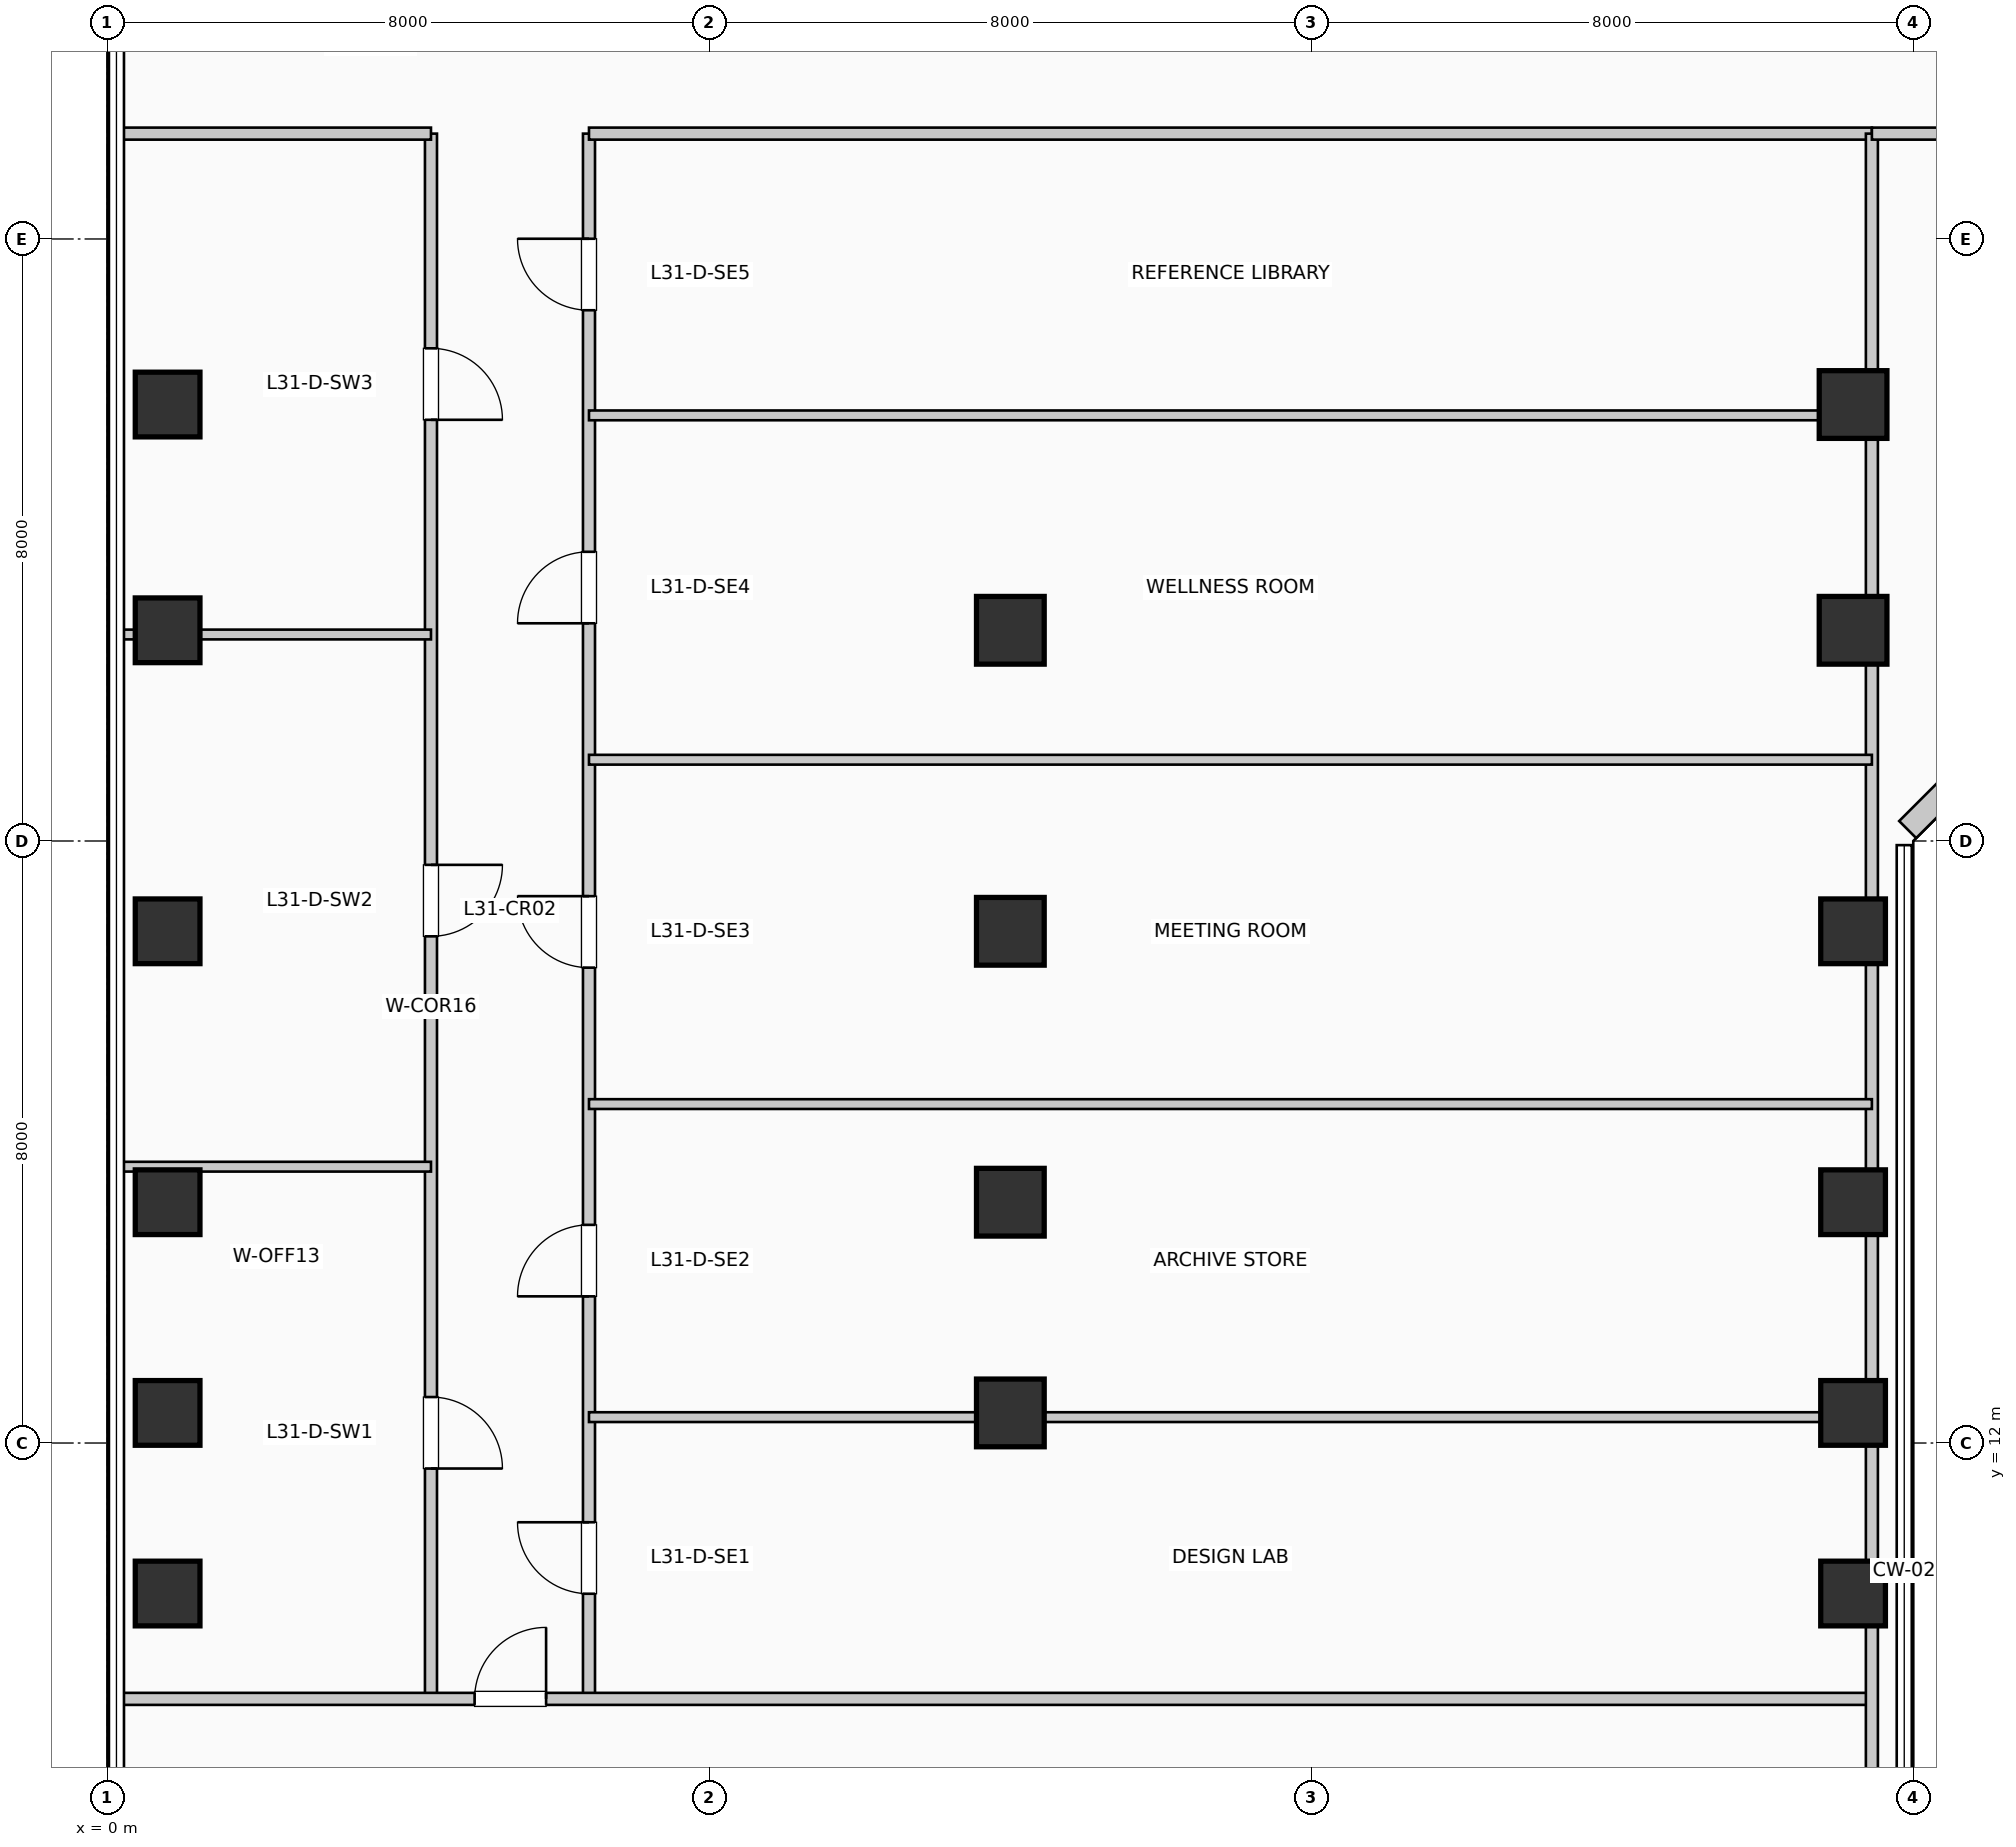
"""IFC4 building model, lengths in metres.
Left out: names, types, materials, properties, quantities, classifications, styles, units other than length and angle.
Written with IfcOpenShell. Run it as: python <this file> out.ifc"""

import sys

from ifc_helpers import new_model, si_unit, direction, frame, frame_2d, origin, origin_2d, place, context, subcontext, project, spatial, rectangle, extrude, element, fill, save


model = new_model("IFC4")
c1 = context("Model", 3, precision=1e-05, world=origin(), true_north=direction((0.0, 1.0)))
c2 = subcontext(c1, "Body", "Model", "MODEL_VIEW")
j1 = project(units=[si_unit("LENGTHUNIT", "METRE"), si_unit("PLANEANGLEUNIT", "RADIAN")], contexts=[c1])
p1 = place(None, origin())
s1 = spatial("IfcSite", under=j1, at=p1, CompositionType="ELEMENT")
p2 = place(p1, origin())
s2 = spatial("IfcBuilding", under=s1, at=p2, CompositionType="ELEMENT")
p3 = place(p2, frame((0.0, 0.0, 130.35)))
s3 = spatial("IfcBuildingStorey", under=s2, at=p3, CompositionType="ELEMENT", Elevation=130.35)
for number, where, z_axis, x_axis in (
    (1, (0.8, 10.0, 0.0), (0.0, 0.0, 1.0), (1.0, 0.0, 0.0)),
    (2, (0.8, 12.4, 0.0), (0.0, 0.0, 1.0), (1.0, 0.0, 0.0)),
    (3, (0.8, 15.2, 0.0), (0.0, 0.0, 1.0), (1.0, 0.0, 0.0)),
    (4, (0.8, 18.8, 0.0), (0.0, 0.0, 1.0), (1.0, 0.0, 0.0)),
    (5, (0.8, 22.8, 0.0), (0.0, 0.0, 1.0), (1.0, 0.0, 0.0)),
    (6, (0.8, 25.8, 0.0), (0.0, 0.0, 1.0), (1.0, 0.0, 0.0)),
):
    element("IfcColumn", number, at=place(p3, frame(where, z_axis=z_axis, x_axis=x_axis)), inside=s3, PredefinedType="COLUMN", context=c2, shape_type="SweptSolid", body=[
        extrude(rectangle(XDim=0.86, YDim=0.86, at=origin_2d()), origin(), (0.0, 0.0, 1.0), 4.62),
    ])
for number, where, z_axis, x_axis in (
    (7, (12.0, 12.4, 0.0), (0.0, 0.0, 1.0), (1.0, 0.0, 0.0)),
    (8, (12.0, 15.2, 0.0), (0.0, 0.0, 1.0), (1.0, 0.0, 0.0)),
    (9, (12.0, 18.8, 0.0), (0.0, 0.0, 1.0), (1.0, 0.0, 0.0)),
    (10, (12.0, 22.8, 0.0), (0.0, 0.0, 1.0), (1.0, 0.0, 0.0)),
):
    element("IfcColumn", number, at=place(p3, frame(where, z_axis=z_axis, x_axis=x_axis)), inside=s3, PredefinedType="COLUMN", context=c2, shape_type="SweptSolid", body=[
        extrude(rectangle(XDim=0.9, YDim=0.9, at=origin_2d()), origin(), (0.0, 0.0, 1.0), 4.62),
    ])
for number, where, z_axis, x_axis in (
    (11, (23.2, 10.0, 0.0), (0.0, 0.0, 1.0), (1.0, 0.0, 0.0)),
    (12, (23.2, 12.4, 0.0), (0.0, 0.0, 1.0), (1.0, 0.0, 0.0)),
    (13, (23.2, 15.2, 0.0), (0.0, 0.0, 1.0), (1.0, 0.0, 0.0)),
    (14, (23.2, 18.8, 0.0), (0.0, 0.0, 1.0), (1.0, 0.0, 0.0)),
):
    element("IfcColumn", number, at=place(p3, frame(where, z_axis=z_axis, x_axis=x_axis)), inside=s3, PredefinedType="COLUMN", context=c2, shape_type="SweptSolid", body=[
        extrude(rectangle(XDim=0.86, YDim=0.86, at=origin_2d()), origin(), (0.0, 0.0, 1.0), 4.62),
    ])
for number, where, z_axis, x_axis in (
    (15, (23.2, 22.8, 0.0), (0.0, 0.0, 1.0), (1.0, 0.0, 0.0)),
    (16, (23.2, 25.8, 0.0), (0.0, 0.0, 1.0), (1.0, 0.0, 0.0)),
):
    element("IfcColumn", number, at=place(p3, frame(where, z_axis=z_axis, x_axis=x_axis)), inside=s3, PredefinedType="COLUMN", context=c2, shape_type="SweptSolid", body=[
        extrude(rectangle(XDim=0.9, YDim=0.9, at=origin_2d()), origin(), (0.0, 0.0, 1.0), 4.62),
    ])
p4 = place(p3, frame((23.926, 20.152, 0.0), z_axis=(0.0, 0.0, 1.0), x_axis=(0.707106781187, 0.707106781187, 0.0)))
e17 = element("IfcWall", 17, at=p4, inside=s3, PredefinedType="SOLIDWALL", context=c2, shape_type="SweptSolid", body=[
    extrude(rectangle(XDim=2.718, YDim=0.32, at=frame_2d((1.359, 0.0))), origin(), (0.0, 0.0, 1.0), 4.37),
])
p5 = place(p3, frame((4.3, 8.6, 0.0), z_axis=(0.0, 0.0, 1.0), x_axis=(0.0, 1.0, 0.0)))
e18 = element("IfcWall", 18, at=p5, inside=s3, PredefinedType="PARTITIONING", context=c2, shape_type="SweptSolid", body=[
    extrude(rectangle(XDim=20.8, YDim=0.16, at=frame_2d((10.4, 0.0))), origin(), (0.0, 0.0, 1.0), 4.37),
])
p6 = place(p5, frame((4.011, 0.0, 0.0), z_axis=(0.0, 0.0, 1.0), x_axis=(-1.0, 0.0, 0.0)))
e19 = element("IfcOpeningElement", 19, at=p6, cuts=e18, PredefinedType="OPENING", context=c2, shape_type="SweptSolid", body=[
    extrude(rectangle(XDim=0.95, YDim=2.15, at=frame_2d((0.475, 1.075))), frame((0.0, 0.09, 0.0), z_axis=(0.0, -1.0, 0.0), x_axis=(1.0, 0.0, 0.0)), (0.0, 0.0, 1.0), 0.18),
])
p7 = place(p5, frame((11.083, 0.0, 0.0), z_axis=(0.0, 0.0, 1.0), x_axis=(-1.0, 0.0, 0.0)))
e20 = element("IfcOpeningElement", 20, at=p7, cuts=e18, PredefinedType="OPENING", context=c2, shape_type="SweptSolid", body=[
    extrude(rectangle(XDim=0.95, YDim=2.15, at=frame_2d((0.475, 1.075))), frame((0.0, 0.09, 0.0), z_axis=(0.0, -1.0, 0.0), x_axis=(1.0, 0.0, 0.0)), (0.0, 0.0, 1.0), 0.18),
])
p8 = place(p5, frame((17.947, 0.0, 0.0), z_axis=(0.0, 0.0, 1.0), x_axis=(-1.0, 0.0, 0.0)))
e21 = element("IfcOpeningElement", 21, at=p8, cuts=e18, PredefinedType="OPENING", context=c2, shape_type="SweptSolid", body=[
    extrude(rectangle(XDim=0.95, YDim=2.15, at=frame_2d((0.475, 1.075))), frame((0.0, 0.09, 0.0), z_axis=(0.0, -1.0, 0.0), x_axis=(1.0, 0.0, 0.0)), (0.0, 0.0, 1.0), 0.18),
])
p9 = place(p3, frame((6.4, 8.6, 0.0), z_axis=(0.0, 0.0, 1.0), x_axis=(0.0, 1.0, 0.0)))
e22 = element("IfcWall", 22, at=p9, inside=s3, PredefinedType="PARTITIONING", context=c2, shape_type="SweptSolid", body=[
    extrude(rectangle(XDim=20.8, YDim=0.16, at=frame_2d((10.4, 0.0))), origin(), (0.0, 0.0, 1.0), 4.37),
])
p10 = place(p9, frame((1.397, 0.0, 0.0)))
e23 = element("IfcOpeningElement", 23, at=p10, cuts=e22, PredefinedType="OPENING", context=c2, shape_type="SweptSolid", body=[
    extrude(rectangle(XDim=0.95, YDim=2.15, at=frame_2d((0.475, 1.075))), frame((0.0, 0.09, 0.0), z_axis=(0.0, -1.0, 0.0), x_axis=(1.0, 0.0, 0.0)), (0.0, 0.0, 1.0), 0.18),
])
p11 = place(p9, frame((5.349, 0.0, 0.0)))
e24 = element("IfcOpeningElement", 24, at=p11, cuts=e22, PredefinedType="OPENING", context=c2, shape_type="SweptSolid", body=[
    extrude(rectangle(XDim=0.95, YDim=2.15, at=frame_2d((0.475, 1.075))), frame((0.0, 0.09, 0.0), z_axis=(0.0, -1.0, 0.0), x_axis=(1.0, 0.0, 0.0)), (0.0, 0.0, 1.0), 0.18),
])
p12 = place(p9, frame((9.717, 0.0, 0.0)))
e25 = element("IfcOpeningElement", 25, at=p12, cuts=e22, PredefinedType="OPENING", context=c2, shape_type="SweptSolid", body=[
    extrude(rectangle(XDim=0.95, YDim=2.15, at=frame_2d((0.475, 1.075))), frame((0.0, 0.09, 0.0), z_axis=(0.0, -1.0, 0.0), x_axis=(1.0, 0.0, 0.0)), (0.0, 0.0, 1.0), 0.18),
])
p13 = place(p9, frame((14.293, 0.0, 0.0)))
e26 = element("IfcOpeningElement", 26, at=p13, cuts=e22, PredefinedType="OPENING", context=c2, shape_type="SweptSolid", body=[
    extrude(rectangle(XDim=0.95, YDim=2.15, at=frame_2d((0.475, 1.075))), frame((0.0, 0.09, 0.0), z_axis=(0.0, -1.0, 0.0), x_axis=(1.0, 0.0, 0.0)), (0.0, 0.0, 1.0), 0.18),
])
p14 = place(p9, frame((18.453, 0.0, 0.0)))
e27 = element("IfcOpeningElement", 27, at=p14, cuts=e22, PredefinedType="OPENING", context=c2, shape_type="SweptSolid", body=[
    extrude(rectangle(XDim=0.95, YDim=2.15, at=frame_2d((0.475, 1.075))), frame((0.0, 0.09, 0.0), z_axis=(0.0, -1.0, 0.0), x_axis=(1.0, 0.0, 0.0)), (0.0, 0.0, 1.0), 0.18),
])
p15 = place(p3, frame((0.19, 8.6, 0.0), z_axis=(0.0, 0.0, 1.0), x_axis=(1.0, 0.0, 0.0)))
e28 = element("IfcWall", 28, at=p15, inside=s3, PredefinedType="PARTITIONING", context=c2, shape_type="SweptSolid", body=[
    extrude(rectangle(XDim=23.26, YDim=0.16, at=frame_2d((11.63, 0.0))), origin(), (0.0, 0.0, 1.0), 4.37),
])
p16 = place(p15, frame((4.69, 0.0, 0.0)))
e29 = element("IfcOpeningElement", 29, at=p16, cuts=e28, PredefinedType="OPENING", context=c2, shape_type="SweptSolid", body=[
    extrude(rectangle(XDim=0.95, YDim=2.15, at=frame_2d((0.475, 1.075))), frame((0.0, 0.09, 0.0), z_axis=(0.0, -1.0, 0.0), x_axis=(1.0, 0.0, 0.0)), (0.0, 0.0, 1.0), 0.18),
])
p17 = place(p3, frame((0.19, 29.4, 0.0), z_axis=(0.0, 0.0, 1.0), x_axis=(1.0, 0.0, 0.0)))
e30 = element("IfcWall", 30, at=p17, inside=s3, PredefinedType="PARTITIONING", context=c2, shape_type="SweptSolid", body=[
    extrude(rectangle(XDim=4.11, YDim=0.16, at=frame_2d((2.055, 0.0))), origin(), (0.0, 0.0, 1.0), 4.025),
])
p18 = place(p3, frame((6.4, 29.4, 0.0), z_axis=(0.0, 0.0, 1.0), x_axis=(1.0, 0.0, 0.0)))
e31 = element("IfcWall", 31, at=p18, inside=s3, PredefinedType="PARTITIONING", context=c2, shape_type="SweptSolid", body=[
    extrude(rectangle(XDim=17.05, YDim=0.16, at=frame_2d((8.525, 0.0))), origin(), (0.0, 0.0, 1.0), 4.025),
])
p19 = place(p3, frame((23.45, 1.04, 0.0), z_axis=(0.0, 0.0, 1.0), x_axis=(0.0, 1.0, 0.0)))
e32 = element("IfcWall", 32, at=p19, inside=s3, PredefinedType="PARTITIONING", context=c2, shape_type="SweptSolid", body=[
    extrude(rectangle(XDim=28.36, YDim=0.16, at=frame_2d((14.18, 0.0))), origin(), (0.0, 0.0, 1.0), 3.705),
])
for number, where, z_axis, x_axis in (
    (33, (0.19, 15.672, 0.0), (0.0, 0.0, 1.0), (1.0, 0.0, 0.0)),
    (34, (0.19, 22.744, 0.0), (0.0, 0.0, 1.0), (1.0, 0.0, 0.0)),
):
    element("IfcWall", number, at=place(p3, frame(where, z_axis=z_axis, x_axis=x_axis)), inside=s3, PredefinedType="PARTITIONING", context=c2, shape_type="SweptSolid", body=[
        extrude(rectangle(XDim=4.11, YDim=0.13, at=frame_2d((2.055, 0.0))), origin(), (0.0, 0.0, 1.0), 3.705),
    ])
p20 = place(p3, frame((6.4, 12.344, 0.0), z_axis=(0.0, 0.0, 1.0), x_axis=(1.0, 0.0, 0.0)))
e35 = element("IfcWall", 35, at=p20, inside=s3, PredefinedType="PARTITIONING", context=c2, shape_type="SweptSolid", body=[
    extrude(rectangle(XDim=17.05, YDim=0.13, at=frame_2d((8.525, 0.0))), origin(), (0.0, 0.0, 1.0), 3.705),
])
for number, where, z_axis, x_axis in (
    (36, (6.4, 16.504, 0.0), (0.0, 0.0, 1.0), (1.0, 0.0, 0.0)),
    (37, (6.4, 21.08, 0.0), (0.0, 0.0, 1.0), (1.0, 0.0, 0.0)),
):
    element("IfcWall", number, at=place(p3, frame(where, z_axis=z_axis, x_axis=x_axis)), inside=s3, PredefinedType="PARTITIONING", context=c2, shape_type="SweptSolid", body=[
        extrude(rectangle(XDim=17.05, YDim=0.13, at=frame_2d((8.525, 0.0))), origin(), (0.0, 0.0, 1.0), 4.37),
    ])
p21 = place(p3, frame((6.4, 25.656, 0.0), z_axis=(0.0, 0.0, 1.0), x_axis=(1.0, 0.0, 0.0)))
e38 = element("IfcWall", 38, at=p21, inside=s3, PredefinedType="PARTITIONING", context=c2, shape_type="SweptSolid", body=[
    extrude(rectangle(XDim=17.05, YDim=0.13, at=frame_2d((8.525, 0.0))), origin(), (0.0, 0.0, 1.0), 3.705),
])
p22 = place(p3, frame((23.45, 29.4, 0.0), z_axis=(0.0, 0.0, 1.0), x_axis=(1.0, 0.0, 0.0)))
e39 = element("IfcWall", 39, at=p22, inside=s3, PredefinedType="PARTITIONING", context=c2, shape_type="SweptSolid", body=[
    extrude(rectangle(XDim=26.56, YDim=0.16, at=frame_2d((13.28, 0.0))), origin(), (0.0, 0.0, 1.0), 4.025),
])
p23 = place(p22, frame((6.052, 0.0, 0.0), z_axis=(0.0, 0.0, 1.0), x_axis=(-1.0, 0.0, 0.0)))
e40 = element("IfcOpeningElement", 40, at=p23, cuts=e39, PredefinedType="OPENING", context=c2, shape_type="SweptSolid", body=[
    extrude(rectangle(XDim=0.95, YDim=2.15, at=frame_2d((0.475, 1.075))), frame((0.0, 0.09, 0.0), z_axis=(0.0, -1.0, 0.0), x_axis=(1.0, 0.0, 0.0)), (0.0, 0.0, 1.0), 0.18),
])
p24 = place(p22, frame((19.333, 0.0, 0.0), z_axis=(0.0, 0.0, 1.0), x_axis=(-1.0, 0.0, 0.0)))
e41 = element("IfcOpeningElement", 41, at=p24, cuts=e39, PredefinedType="OPENING", context=c2, shape_type="SweptSolid", body=[
    extrude(rectangle(XDim=0.95, YDim=2.15, at=frame_2d((0.475, 1.075))), frame((0.0, 0.09, 0.0), z_axis=(0.0, -1.0, 0.0), x_axis=(1.0, 0.0, 0.0)), (0.0, 0.0, 1.0), 0.18),
])
p25 = place(p16, origin())
e42 = element("IfcDoor", 42, at=p25, inside=s3, OperationType="SINGLE_SWING_RIGHT", PredefinedType="DOOR", context=c2, shape_type="SweptSolid", body=[
    extrude(rectangle(XDim=0.95, YDim=2.15, at=frame_2d((0.475, 1.075))), frame((0.0, 0.025, 0.0), z_axis=(0.0, -1.0, 0.0), x_axis=(1.0, 0.0, 0.0)), (0.0, 0.0, 1.0), 0.05),
])
fill(e29, e42)
p26 = place(p6, origin())
e43 = element("IfcDoor", 43, at=p26, inside=s3, OperationType="SINGLE_SWING_LEFT", PredefinedType="DOOR", context=c2, shape_type="SweptSolid", body=[
    extrude(rectangle(XDim=0.95, YDim=2.15, at=frame_2d((0.475, 1.075))), frame((0.0, 0.025, 0.0), z_axis=(0.0, -1.0, 0.0), x_axis=(1.0, 0.0, 0.0)), (0.0, 0.0, 1.0), 0.05),
])
fill(e19, e43)
p27 = place(p7, origin())
e44 = element("IfcDoor", 44, at=p27, inside=s3, OperationType="SINGLE_SWING_RIGHT", PredefinedType="DOOR", context=c2, shape_type="SweptSolid", body=[
    extrude(rectangle(XDim=0.95, YDim=2.15, at=frame_2d((0.475, 1.075))), frame((0.0, 0.025, 0.0), z_axis=(0.0, -1.0, 0.0), x_axis=(1.0, 0.0, 0.0)), (0.0, 0.0, 1.0), 0.05),
])
fill(e20, e44)
p28 = place(p8, origin())
e45 = element("IfcDoor", 45, at=p28, inside=s3, OperationType="SINGLE_SWING_LEFT", PredefinedType="DOOR", context=c2, shape_type="SweptSolid", body=[
    extrude(rectangle(XDim=0.95, YDim=2.15, at=frame_2d((0.475, 1.075))), frame((0.0, 0.025, 0.0), z_axis=(0.0, -1.0, 0.0), x_axis=(1.0, 0.0, 0.0)), (0.0, 0.0, 1.0), 0.05),
])
fill(e21, e45)
p29 = place(p10, origin())
e46 = element("IfcDoor", 46, at=p29, inside=s3, OperationType="SINGLE_SWING_RIGHT", PredefinedType="DOOR", context=c2, shape_type="SweptSolid", body=[
    extrude(rectangle(XDim=0.95, YDim=2.15, at=frame_2d((0.475, 1.075))), frame((0.0, 0.025, 0.0), z_axis=(0.0, -1.0, 0.0), x_axis=(1.0, 0.0, 0.0)), (0.0, 0.0, 1.0), 0.05),
])
fill(e23, e46)
p30 = place(p11, origin())
e47 = element("IfcDoor", 47, at=p30, inside=s3, OperationType="SINGLE_SWING_LEFT", PredefinedType="DOOR", context=c2, shape_type="SweptSolid", body=[
    extrude(rectangle(XDim=0.95, YDim=2.15, at=frame_2d((0.475, 1.075))), frame((0.0, 0.025, 0.0), z_axis=(0.0, -1.0, 0.0), x_axis=(1.0, 0.0, 0.0)), (0.0, 0.0, 1.0), 0.05),
])
fill(e24, e47)
p31 = place(p12, origin())
e48 = element("IfcDoor", 48, at=p31, inside=s3, OperationType="SINGLE_SWING_RIGHT", PredefinedType="DOOR", context=c2, shape_type="SweptSolid", body=[
    extrude(rectangle(XDim=0.95, YDim=2.15, at=frame_2d((0.475, 1.075))), frame((0.0, 0.025, 0.0), z_axis=(0.0, -1.0, 0.0), x_axis=(1.0, 0.0, 0.0)), (0.0, 0.0, 1.0), 0.05),
])
fill(e25, e48)
p32 = place(p13, origin())
e49 = element("IfcDoor", 49, at=p32, inside=s3, OperationType="SINGLE_SWING_LEFT", PredefinedType="DOOR", context=c2, shape_type="SweptSolid", body=[
    extrude(rectangle(XDim=0.95, YDim=2.15, at=frame_2d((0.475, 1.075))), frame((0.0, 0.025, 0.0), z_axis=(0.0, -1.0, 0.0), x_axis=(1.0, 0.0, 0.0)), (0.0, 0.0, 1.0), 0.05),
])
fill(e26, e49)
p33 = place(p14, origin())
e50 = element("IfcDoor", 50, at=p33, inside=s3, OperationType="SINGLE_SWING_RIGHT", PredefinedType="DOOR", context=c2, shape_type="SweptSolid", body=[
    extrude(rectangle(XDim=0.95, YDim=2.15, at=frame_2d((0.475, 1.075))), frame((0.0, 0.025, 0.0), z_axis=(0.0, -1.0, 0.0), x_axis=(1.0, 0.0, 0.0)), (0.0, 0.0, 1.0), 0.05),
])
fill(e27, e50)
save(model, sys.argv[1])
